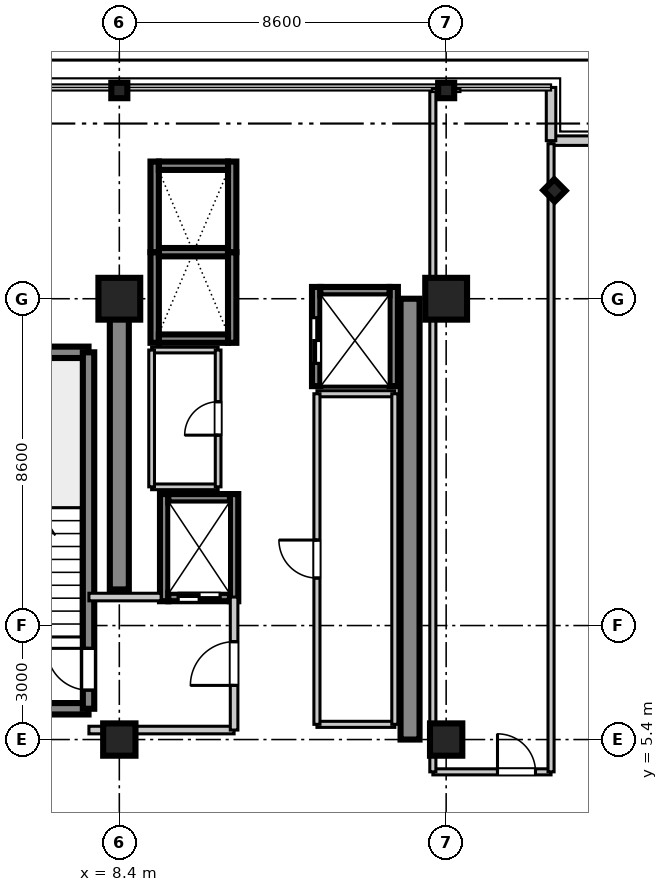
"""IFC4 building model, lengths in metres.
Left out: names, types, materials, properties, quantities, classifications, styles, units other than length and angle.
Written with IfcOpenShell. Run it as: python <this file> out.ifc"""

import sys

from ifc_helpers import new_model, si_unit, direction, frame, frame_2d, origin, origin_2d, place, context, subcontext, project, spatial, rectangle, i_section, extrude, source, transform, mapped, element, fill, save


model = new_model("IFC4")
c1 = context("Model", 3, precision=1e-05, world=origin(), true_north=direction((0.0, 1.0)))
c2 = subcontext(c1, "Body", "Model", "MODEL_VIEW")
j1 = project(units=[si_unit("LENGTHUNIT", "METRE"), si_unit("PLANEANGLEUNIT", "RADIAN")], contexts=[c1])
p1 = place(None, origin())
s1 = spatial("IfcSite", under=j1, at=p1, CompositionType="ELEMENT")
p2 = place(p1, origin())
s2 = spatial("IfcBuilding", under=s1, at=p2, CompositionType="ELEMENT")
p3 = place(p2, frame((0.0, 0.0, 149.0)))
s3 = spatial("IfcBuildingStorey", under=s2, at=p3, CompositionType="ELEMENT", Elevation=149.0)
m1 = source(origin(), c2, "Body", "SweptSolid", [
    extrude(rectangle(XDim=0.85, YDim=0.85, at=origin_2d()), origin(), (0.0, 0.0, 1.0), 3.605),
])
p4 = place(p3, frame((8.4, 5.4, 0.0), z_axis=(0.0, 0.0, 1.0), x_axis=(1.0, 0.0, 0.0)))
e1 = element("IfcColumn", 1, at=p4, inside=s3, PredefinedType="PILASTER", context=c2, shape_type="MappedRepresentation", body=[
    mapped(m1, transform((0.0, 0.0, 0.0), scale=1.0)),
])
m2 = source(origin(), c2, "Body", "SweptSolid", [
    extrude(rectangle(XDim=1.1, YDim=1.1, at=origin_2d()), origin(), (0.0, 0.0, 1.0), 3.605),
])
p5 = place(p3, frame((8.4, 17.0, 0.0), z_axis=(0.0, 0.0, 1.0), x_axis=(1.0, 0.0, 0.0)))
e2 = element("IfcColumn", 2, at=p5, inside=s3, PredefinedType="COLUMN", context=c2, shape_type="MappedRepresentation", body=[
    mapped(m2, transform((0.0, 0.0, 0.0), scale=1.0)),
])
p6 = place(p3, frame((17.0, 5.4, 0.0), z_axis=(0.0, 0.0, 1.0), x_axis=(1.0, 0.0, 0.0)))
e3 = element("IfcColumn", 3, at=p6, inside=s3, PredefinedType="PILASTER", context=c2, shape_type="MappedRepresentation", body=[
    mapped(m1, transform((0.0, 0.0, 0.0), scale=1.0)),
])
p7 = place(p3, frame((17.0, 17.0, 0.0), z_axis=(0.0, 0.0, 1.0), x_axis=(1.0, 0.0, 0.0)))
e4 = element("IfcColumn", 4, at=p7, inside=s3, PredefinedType="COLUMN", context=c2, shape_type="MappedRepresentation", body=[
    mapped(m2, transform((0.0, 0.0, 0.0), scale=1.0)),
])
m3 = source(origin(), c2, "Body", "SweptSolid", [
    extrude(i_section(OverallWidth=0.406, OverallDepth=0.422, WebThickness=0.019, FlangeThickness=0.03, at=origin_2d()), origin(), (0.0, 0.0, 1.0), 3.605),
])
for number, where, z_axis, x_axis in (
    (5, (8.4, 22.48, 0.0), (0.0, 0.0, 1.0), (0.0, 1.0, 0.0)),
    (6, (17.0, 22.48, 0.0), (0.0, 0.0, 1.0), (0.0, 1.0, 0.0)),
    (7, (19.85, 19.85, 0.0), (0.0, 0.0, 1.0), (0.707, 0.707, 0.0)),
):
    element("IfcColumn", number, at=place(p3, frame(where, z_axis=z_axis, x_axis=x_axis)), inside=s3, PredefinedType="COLUMN", context=c2, shape_type="MappedRepresentation", body=[
        mapped(m3, transform((0.0, 0.0, 0.0), scale=1.0)),
    ])
m4 = source(origin(), c2, "Body", "SweptSolid", [
    extrude(rectangle(XDim=7.65, YDim=0.5, at=frame_2d((3.825, 0.0))), origin(), (0.0, 0.0, 1.0), 3.39),
])
p8 = place(p3, frame((8.4, 9.35, 0.0), z_axis=(0.0, 0.0, 1.0), x_axis=(0.0, 1.0, 0.0)))
e8 = element("IfcWall", 8, at=p8, inside=s3, PredefinedType="SHEAR", context=c2, shape_type="MappedRepresentation", body=[
    mapped(m4, transform((0.0, 0.0, 0.0), scale=1.0)),
])
m5 = source(origin(), c2, "Body", "SweptSolid", [
    extrude(rectangle(XDim=11.6, YDim=0.5, at=frame_2d((5.8, 0.0))), origin(), (0.0, 0.0, 1.0), 3.39),
])
p9 = place(p3, frame((16.05, 5.4, 0.0), z_axis=(0.0, 0.0, 1.0), x_axis=(0.0, 1.0, 0.0)))
e9 = element("IfcWall", 9, at=p9, inside=s3, PredefinedType="SHEAR", context=c2, shape_type="MappedRepresentation", body=[
    mapped(m5, transform((0.0, 0.0, 0.0), scale=1.0)),
])
m6 = source(origin(), c2, "Body", "SweptSolid", [
    extrude(rectangle(XDim=3.98, YDim=0.3, at=frame_2d((1.99, 0.0))), origin(), (0.0, 0.0, 1.0), 3.39),
])
for number, where, z_axis, x_axis in (
    (10, (3.61, 6.21, 0.0), (0.0, 0.0, 1.0), (1.0, 0.0, 0.0)),
    (11, (3.61, 15.59, 0.0), (0.0, 0.0, 1.0), (1.0, 0.0, 0.0)),
):
    element("IfcWall", number, at=place(p3, frame(where, z_axis=z_axis, x_axis=x_axis)), inside=s3, PredefinedType="SHEAR", context=c2, shape_type="MappedRepresentation", body=[
        mapped(m6, transform((0.0, 0.0, 0.0), scale=1.0)),
    ])
m7 = source(origin(), c2, "Body", "SweptSolid", [
    extrude(rectangle(XDim=9.38, YDim=0.3, at=frame_2d((4.69, 0.0))), origin(), (0.0, 0.0, 1.0), 3.39),
])
p10 = place(p3, frame((7.59, 6.21, 0.0), z_axis=(0.0, 0.0, 1.0), x_axis=(0.0, 1.0, 0.0)))
e12 = element("IfcWall", 12, at=p10, inside=s3, PredefinedType="SHEAR", context=c2, shape_type="MappedRepresentation", body=[
    mapped(m7, transform((0.0, 0.0, 0.0), scale=1.0)),
])
p11 = place(p10, frame((0.49, 0.0, 0.0)))
e13 = element("IfcOpeningElement", 13, at=p11, cuts=e12, PredefinedType="OPENING", context=c2, shape_type="SweptSolid", body=[
    extrude(rectangle(XDim=1.1, YDim=2.15, at=frame_2d((0.55, 1.075))), frame((0.0, 0.16, 0.0), z_axis=(0.0, -1.0, 0.0), x_axis=(1.0, 0.0, 0.0)), (0.0, 0.0, 1.0), 0.32),
])
m8 = source(origin(), c2, "Body", "SweptSolid", [
    extrude(rectangle(XDim=2.385, YDim=0.22, at=frame_2d((1.192, 0.0))), origin(), (0.0, 0.0, 1.0), 3.39),
])
for number, where, z_axis, x_axis in (
    (14, (9.33, 15.84, 0.0), (0.0, 0.0, 1.0), (0.0, 1.0, 0.0)),
    (15, (11.37, 15.84, 0.0), (0.0, 0.0, 1.0), (0.0, 1.0, 0.0)),
):
    element("IfcWall", number, at=place(p3, frame(where, z_axis=z_axis, x_axis=x_axis)), inside=s3, PredefinedType="SHEAR", context=c2, shape_type="MappedRepresentation", body=[
        mapped(m8, transform((0.0, 0.0, 0.0), scale=1.0)),
    ])
m9 = source(origin(), c2, "Body", "SweptSolid", [
    extrude(rectangle(XDim=1.82, YDim=0.22, at=frame_2d((0.91, 0.0))), origin(), (0.0, 0.0, 1.0), 3.39),
])
p12 = place(p3, frame((9.44, 15.95, 0.0), z_axis=(0.0, 0.0, 1.0), x_axis=(1.0, 0.0, 0.0)))
e16 = element("IfcWall", 16, at=p12, inside=s3, PredefinedType="SHEAR", context=c2, shape_type="MappedRepresentation", body=[
    mapped(m9, transform((0.0, 0.0, 0.0), scale=1.0)),
])
m10 = source(origin(), c2, "Body", "SweptSolid", [
    extrude(rectangle(XDim=1.82, YDim=0.22, at=frame_2d((0.91, 0.0))), origin(), (0.0, 0.0, 1.0), 3.65),
])
p13 = place(p3, frame((9.44, 18.225, 0.0), z_axis=(0.0, 0.0, 1.0), x_axis=(1.0, 0.0, 0.0)))
e17 = element("IfcWall", 17, at=p13, inside=s3, PredefinedType="SHEAR", context=c2, shape_type="MappedRepresentation", body=[
    mapped(m10, transform((0.0, 0.0, 0.0), scale=1.0)),
])
for number, where, z_axis, x_axis in (
    (18, (9.33, 18.225, 0.0), (0.0, 0.0, 1.0), (0.0, 1.0, 0.0)),
    (19, (11.37, 18.225, 0.0), (0.0, 0.0, 1.0), (0.0, 1.0, 0.0)),
):
    element("IfcWall", number, at=place(p3, frame(where, z_axis=z_axis, x_axis=x_axis)), inside=s3, PredefinedType="SHEAR", context=c2, shape_type="MappedRepresentation", body=[
        mapped(m8, transform((0.0, 0.0, 0.0), scale=1.0)),
    ])
p14 = place(p3, frame((9.44, 20.5, 0.0), z_axis=(0.0, 0.0, 1.0), x_axis=(1.0, 0.0, 0.0)))
e20 = element("IfcWall", 20, at=p14, inside=s3, PredefinedType="SHEAR", context=c2, shape_type="MappedRepresentation", body=[
    mapped(m9, transform((0.0, 0.0, 0.0), scale=1.0)),
])
m11 = source(origin(), c2, "Body", "SweptSolid", [
    extrude(rectangle(XDim=2.82, YDim=0.22, at=frame_2d((1.41, 0.0))), origin(), (0.0, 0.0, 1.0), 3.39),
])
for number, where, z_axis, x_axis in (
    (21, (9.58, 9.04, 0.0), (0.0, 0.0, 1.0), (0.0, 1.0, 0.0)),
    (22, (11.42, 9.04, 0.0), (0.0, 0.0, 1.0), (0.0, 1.0, 0.0)),
):
    element("IfcWall", number, at=place(p3, frame(where, z_axis=z_axis, x_axis=x_axis)), inside=s3, PredefinedType="SHEAR", context=c2, shape_type="MappedRepresentation", body=[
        mapped(m11, transform((0.0, 0.0, 0.0), scale=1.0)),
    ])
m12 = source(origin(), c2, "Body", "SweptSolid", [
    extrude(rectangle(XDim=1.62, YDim=0.22, at=frame_2d((0.81, 0.0))), origin(), (0.0, 0.0, 1.0), 3.39),
])
p15 = place(p3, frame((9.69, 9.15, 0.0), z_axis=(0.0, 0.0, 1.0), x_axis=(1.0, 0.0, 0.0)))
e23 = element("IfcWall", 23, at=p15, inside=s3, PredefinedType="SHEAR", context=c2, shape_type="MappedRepresentation", body=[
    mapped(m12, transform((0.0, 0.0, 0.0), scale=1.0)),
])
p16 = place(p15, frame((0.26, 0.0, 0.0)))
e24 = element("IfcOpeningElement", 24, at=p16, cuts=e23, PredefinedType="OPENING", context=c2, shape_type="SweptSolid", body=[
    extrude(rectangle(XDim=1.1, YDim=2.2, at=frame_2d((0.55, 1.1))), frame((0.0, 0.12, 0.0), z_axis=(0.0, -1.0, 0.0), x_axis=(1.0, 0.0, 0.0)), (0.0, 0.0, 1.0), 0.24),
])
p17 = place(p3, frame((9.69, 11.75, 0.0), z_axis=(0.0, 0.0, 1.0), x_axis=(1.0, 0.0, 0.0)))
e25 = element("IfcWall", 25, at=p17, inside=s3, PredefinedType="SHEAR", context=c2, shape_type="MappedRepresentation", body=[
    mapped(m12, transform((0.0, 0.0, 0.0), scale=1.0)),
])
m13 = source(origin(), c2, "Body", "SweptSolid", [
    extrude(rectangle(XDim=2.61, YDim=0.22, at=frame_2d((1.305, 0.0))), origin(), (0.0, 0.0, 1.0), 3.39),
])
p18 = place(p3, frame((13.58, 14.7, 0.0), z_axis=(0.0, 0.0, 1.0), x_axis=(0.0, 1.0, 0.0)))
e26 = element("IfcWall", 26, at=p18, inside=s3, PredefinedType="SHEAR", context=c2, shape_type="MappedRepresentation", body=[
    mapped(m13, transform((0.0, 0.0, 0.0), scale=1.0)),
])
p19 = place(p18, frame((0.6, 0.0, 0.0)))
e27 = element("IfcOpeningElement", 27, at=p19, cuts=e26, PredefinedType="OPENING", context=c2, shape_type="SweptSolid", body=[
    extrude(rectangle(XDim=1.2, YDim=2.2, at=frame_2d((0.6, 1.1))), frame((0.0, 0.12, 0.0), z_axis=(0.0, -1.0, 0.0), x_axis=(1.0, 0.0, 0.0)), (0.0, 0.0, 1.0), 0.24),
])
p20 = place(p3, frame((15.62, 14.7, 0.0), z_axis=(0.0, 0.0, 1.0), x_axis=(0.0, 1.0, 0.0)))
e28 = element("IfcWall", 28, at=p20, inside=s3, PredefinedType="SHEAR", context=c2, shape_type="MappedRepresentation", body=[
    mapped(m13, transform((0.0, 0.0, 0.0), scale=1.0)),
])
p21 = place(p3, frame((13.69, 17.2, 0.0), z_axis=(0.0, 0.0, 1.0), x_axis=(1.0, 0.0, 0.0)))
e29 = element("IfcWall", 29, at=p21, inside=s3, PredefinedType="SHEAR", context=c2, shape_type="MappedRepresentation", body=[
    mapped(m9, transform((0.0, 0.0, 0.0), scale=1.0)),
])
m14 = source(origin(), c2, "Body", "SweptSolid", [
    extrude(rectangle(XDim=1.4, YDim=0.25, at=frame_2d((0.7, 0.0))), origin(), (0.0, 0.0, 1.0), 3.39),
])
p22 = place(p3, frame((19.76, 21.16, 0.0), z_axis=(0.0, 0.0, 1.0), x_axis=(1.0, 0.0, 0.0)))
e30 = element("IfcWall", 30, at=p22, inside=s3, PredefinedType="STANDARD", context=c2, shape_type="MappedRepresentation", body=[
    mapped(m14, transform((0.0, 0.0, 0.0), scale=1.0)),
])
m15 = source(origin(), c2, "Body", "SweptSolid", [
    extrude(rectangle(XDim=1.4, YDim=0.25, at=frame_2d((0.7, 0.0))), origin(), (0.0, 0.0, 1.0), 3.39),
])
p23 = place(p3, frame((19.76, 21.16, 0.0), z_axis=(0.0, 0.0, 1.0), x_axis=(0.0, 1.0, 0.0)))
e31 = element("IfcWall", 31, at=p23, inside=s3, PredefinedType="STANDARD", context=c2, shape_type="MappedRepresentation", body=[
    mapped(m15, transform((0.0, 0.0, 0.0), scale=1.0)),
])
m16 = source(origin(), c2, "Body", "SweptSolid", [
    extrude(rectangle(XDim=3.82, YDim=0.2, at=frame_2d((1.91, 0.0))), origin(), (0.0, 0.0, 1.0), 2.73),
])
p24 = place(p3, frame((7.6, 5.65, 0.0), z_axis=(0.0, 0.0, 1.0), x_axis=(1.0, 0.0, 0.0)))
e32 = element("IfcWall", 32, at=p24, inside=s3, PredefinedType="PARTITIONING", context=c2, shape_type="MappedRepresentation", body=[
    mapped(m16, transform((0.0, 0.0, 0.0), scale=1.0)),
])
m17 = source(origin(), c2, "Body", "SweptSolid", [
    extrude(rectangle(XDim=1.9, YDim=0.2, at=frame_2d((0.95, 0.0))), origin(), (0.0, 0.0, 1.0), 2.73),
])
p25 = place(p3, frame((7.6, 9.15, 0.0), z_axis=(0.0, 0.0, 1.0), x_axis=(1.0, 0.0, 0.0)))
e33 = element("IfcWall", 33, at=p25, inside=s3, PredefinedType="PARTITIONING", context=c2, shape_type="MappedRepresentation", body=[
    mapped(m17, transform((0.0, 0.0, 0.0), scale=1.0)),
])
m18 = source(origin(), c2, "Body", "SweptSolid", [
    extrude(rectangle(XDim=3.5, YDim=0.2, at=frame_2d((1.75, 0.0))), origin(), (0.0, 0.0, 1.0), 2.73),
])
p26 = place(p3, frame((11.42, 5.65, 0.0), z_axis=(0.0, 0.0, 1.0), x_axis=(0.0, 1.0, 0.0)))
e34 = element("IfcWall", 34, at=p26, inside=s3, PredefinedType="PARTITIONING", context=c2, shape_type="MappedRepresentation", body=[
    mapped(m18, transform((0.0, 0.0, 0.0), scale=1.0)),
])
p27 = place(p26, frame((1.175, 0.0, 0.0)))
e35 = element("IfcOpeningElement", 35, at=p27, cuts=e34, PredefinedType="OPENING", context=c2, shape_type="SweptSolid", body=[
    extrude(rectangle(XDim=1.15, YDim=2.15, at=frame_2d((0.575, 1.075))), frame((0.0, 0.11, 0.0), z_axis=(0.0, -1.0, 0.0), x_axis=(1.0, 0.0, 0.0)), (0.0, 0.0, 1.0), 0.22),
])
m19 = source(origin(), c2, "Body", "SweptSolid", [
    extrude(rectangle(XDim=1.75, YDim=0.15, at=frame_2d((0.875, 0.0))), origin(), (0.0, 0.0, 1.0), 2.73),
])
for number, where, z_axis, x_axis in (
    (36, (9.25, 12.05, 0.0), (0.0, 0.0, 1.0), (1.0, 0.0, 0.0)),
    (37, (9.25, 15.65, 0.0), (0.0, 0.0, 1.0), (1.0, 0.0, 0.0)),
):
    element("IfcWall", number, at=place(p3, frame(where, z_axis=z_axis, x_axis=x_axis)), inside=s3, PredefinedType="PARTITIONING", context=c2, shape_type="MappedRepresentation", body=[
        mapped(m19, transform((0.0, 0.0, 0.0), scale=1.0)),
    ])
m20 = source(origin(), c2, "Body", "SweptSolid", [
    extrude(rectangle(XDim=3.6, YDim=0.15, at=frame_2d((1.8, 0.0))), origin(), (0.0, 0.0, 1.0), 2.73),
])
p28 = place(p3, frame((9.25, 12.05, 0.0), z_axis=(0.0, 0.0, 1.0), x_axis=(0.0, 1.0, 0.0)))
e38 = element("IfcWall", 38, at=p28, inside=s3, PredefinedType="PARTITIONING", context=c2, shape_type="MappedRepresentation", body=[
    mapped(m20, transform((0.0, 0.0, 0.0), scale=1.0)),
])
p29 = place(p3, frame((11.0, 12.05, 0.0), z_axis=(0.0, 0.0, 1.0), x_axis=(0.0, 1.0, 0.0)))
e39 = element("IfcWall", 39, at=p29, inside=s3, PredefinedType="PARTITIONING", context=c2, shape_type="MappedRepresentation", body=[
    mapped(m20, transform((0.0, 0.0, 0.0), scale=1.0)),
])
p30 = place(p29, frame((1.36, 0.0, 0.0)))
e40 = element("IfcOpeningElement", 40, at=p30, cuts=e39, PredefinedType="OPENING", context=c2, shape_type="SweptSolid", body=[
    extrude(rectangle(XDim=0.88, YDim=2.1, at=frame_2d((0.44, 1.05))), frame((0.0, 0.085, 0.0), z_axis=(0.0, -1.0, 0.0), x_axis=(1.0, 0.0, 0.0)), (0.0, 0.0, 1.0), 0.17),
])
m21 = source(origin(), c2, "Body", "SweptSolid", [
    extrude(rectangle(XDim=2.05, YDim=0.16, at=frame_2d((1.025, 0.0))), origin(), (0.0, 0.0, 1.0), 2.73),
])
for number, where, z_axis, x_axis in (
    (41, (13.6, 5.8, 0.0), (0.0, 0.0, 1.0), (1.0, 0.0, 0.0)),
    (42, (13.6, 14.5, 0.0), (0.0, 0.0, 1.0), (1.0, 0.0, 0.0)),
):
    element("IfcWall", number, at=place(p3, frame(where, z_axis=z_axis, x_axis=x_axis)), inside=s3, PredefinedType="PARTITIONING", context=c2, shape_type="MappedRepresentation", body=[
        mapped(m21, transform((0.0, 0.0, 0.0), scale=1.0)),
    ])
m22 = source(origin(), c2, "Body", "SweptSolid", [
    extrude(rectangle(XDim=8.7, YDim=0.16, at=frame_2d((4.35, 0.0))), origin(), (0.0, 0.0, 1.0), 2.73),
])
p31 = place(p3, frame((13.6, 5.8, 0.0), z_axis=(0.0, 0.0, 1.0), x_axis=(0.0, 1.0, 0.0)))
e43 = element("IfcWall", 43, at=p31, inside=s3, PredefinedType="PARTITIONING", context=c2, shape_type="MappedRepresentation", body=[
    mapped(m22, transform((0.0, 0.0, 0.0), scale=1.0)),
])
p32 = place(p31, frame((3.85, 0.0, 0.0)))
e44 = element("IfcOpeningElement", 44, at=p32, cuts=e43, PredefinedType="OPENING", context=c2, shape_type="SweptSolid", body=[
    extrude(rectangle(XDim=1.0, YDim=2.1, at=frame_2d((0.5, 1.05))), frame((0.0, 0.09, 0.0), z_axis=(0.0, -1.0, 0.0), x_axis=(1.0, 0.0, 0.0)), (0.0, 0.0, 1.0), 0.18),
])
p33 = place(p3, frame((15.65, 5.8, 0.0), z_axis=(0.0, 0.0, 1.0), x_axis=(0.0, 1.0, 0.0)))
e45 = element("IfcWall", 45, at=p33, inside=s3, PredefinedType="PARTITIONING", context=c2, shape_type="MappedRepresentation", body=[
    mapped(m22, transform((0.0, 0.0, 0.0), scale=1.0)),
])
m23 = source(origin(), c2, "Body", "SweptSolid", [
    extrude(rectangle(XDim=3.11, YDim=0.16, at=frame_2d((1.555, 0.0))), origin(), (0.0, 0.0, 1.0), 2.73),
])
p34 = place(p3, frame((16.65, 4.55, 0.0), z_axis=(0.0, 0.0, 1.0), x_axis=(1.0, 0.0, 0.0)))
e46 = element("IfcWall", 46, at=p34, inside=s3, PredefinedType="PARTITIONING", context=c2, shape_type="MappedRepresentation", body=[
    mapped(m23, transform((0.0, 0.0, 0.0), scale=1.0)),
])
p35 = place(p34, frame((1.701, 0.0, 0.0)))
e47 = element("IfcOpeningElement", 47, at=p35, cuts=e46, PredefinedType="OPENING", context=c2, shape_type="SweptSolid", body=[
    extrude(rectangle(XDim=1.0, YDim=2.1, at=frame_2d((0.5, 1.05))), frame((0.0, 0.09, 0.0), z_axis=(0.0, -1.0, 0.0), x_axis=(1.0, 0.0, 0.0)), (0.0, 0.0, 1.0), 0.18),
])
m24 = source(origin(), c2, "Body", "SweptSolid", [
    extrude(rectangle(XDim=17.95, YDim=0.16, at=frame_2d((8.975, 0.0))), origin(), (0.0, 0.0, 1.0), 2.73),
])
p36 = place(p3, frame((16.65, 4.55, 0.0), z_axis=(0.0, 0.0, 1.0), x_axis=(0.0, 1.0, 0.0)))
e48 = element("IfcWall", 48, at=p36, inside=s3, PredefinedType="PARTITIONING", context=c2, shape_type="MappedRepresentation", body=[
    mapped(m24, transform((0.0, 0.0, 0.0), scale=1.0)),
])
m25 = source(origin(), c2, "Body", "SweptSolid", [
    extrude(rectangle(XDim=16.53, YDim=0.16, at=frame_2d((8.265, 0.0))), origin(), (0.0, 0.0, 1.0), 2.73),
])
p37 = place(p3, frame((19.76, 4.55, 0.0), z_axis=(0.0, 0.0, 1.0), x_axis=(0.0, 1.0, 0.0)))
e49 = element("IfcWall", 49, at=p37, inside=s3, PredefinedType="PARTITIONING", context=c2, shape_type="MappedRepresentation", body=[
    mapped(m25, transform((0.0, 0.0, 0.0), scale=1.0)),
])
m26 = source(origin(), c2, "Body", "SweptSolid", [
    extrude(rectangle(XDim=1.1, YDim=2.15, at=frame_2d((0.55, 1.075))), frame((0.0, 0.025, 0.0), z_axis=(0.0, -1.0, 0.0), x_axis=(1.0, 0.0, 0.0)), (0.0, 0.0, 1.0), 0.05),
])
p38 = place(p11, origin())
e50 = element("IfcDoor", 50, at=p38, inside=s3, OperationType="SINGLE_SWING_RIGHT", PredefinedType="DOOR", context=c2, shape_type="MappedRepresentation", body=[
    mapped(m26, transform((0.0, 0.0, 0.0), scale=1.0)),
])
fill(e13, e50)
m27 = source(origin(), c2, "Body", "SweptSolid", [
    extrude(rectangle(XDim=1.1, YDim=2.2, at=frame_2d((0.55, 1.1))), frame((0.0, 0.025, 0.0), z_axis=(0.0, -1.0, 0.0), x_axis=(1.0, 0.0, 0.0)), (0.0, 0.0, 1.0), 0.05),
])
p39 = place(p16, frame((1.1, 0.0, 0.0), z_axis=(0.0, 0.0, 1.0), x_axis=(-1.0, 0.0, 0.0)))
e51 = element("IfcDoor", 51, at=p39, inside=s3, OperationType="DOUBLE_DOOR_SLIDING", PredefinedType="DOOR", context=c2, shape_type="MappedRepresentation", body=[
    mapped(m27, transform((0.0, 0.0, 0.0), scale=1.0)),
])
fill(e24, e51)
m28 = source(origin(), c2, "Body", "SweptSolid", [
    extrude(rectangle(XDim=1.2, YDim=2.2, at=frame_2d((0.6, 1.1))), frame((0.0, 0.025, 0.0), z_axis=(0.0, -1.0, 0.0), x_axis=(1.0, 0.0, 0.0)), (0.0, 0.0, 1.0), 0.05),
])
p40 = place(p19, origin())
e52 = element("IfcDoor", 52, at=p40, inside=s3, OperationType="DOUBLE_DOOR_SLIDING", PredefinedType="DOOR", context=c2, shape_type="MappedRepresentation", body=[
    mapped(m28, transform((0.0, 0.0, 0.0), scale=1.0)),
])
fill(e27, e52)
m29 = source(origin(), c2, "Body", "SweptSolid", [
    extrude(rectangle(XDim=1.15, YDim=2.15, at=frame_2d((0.575, 1.075))), frame((0.0, 0.025, 0.0), z_axis=(0.0, -1.0, 0.0), x_axis=(1.0, 0.0, 0.0)), (0.0, 0.0, 1.0), 0.05),
])
p41 = place(p27, frame((1.15, 0.0, 0.0), z_axis=(0.0, 0.0, 1.0), x_axis=(-1.0, 0.0, 0.0)))
e53 = element("IfcDoor", 53, at=p41, inside=s3, OperationType="SINGLE_SWING_LEFT", PredefinedType="DOOR", context=c2, shape_type="MappedRepresentation", body=[
    mapped(m29, transform((0.0, 0.0, 0.0), scale=1.0)),
])
fill(e35, e53)
m30 = source(origin(), c2, "Body", "SweptSolid", [
    extrude(rectangle(XDim=0.88, YDim=2.1, at=frame_2d((0.44, 1.05))), frame((0.0, 0.025, 0.0), z_axis=(0.0, -1.0, 0.0), x_axis=(1.0, 0.0, 0.0)), (0.0, 0.0, 1.0), 0.05),
])
p42 = place(p30, origin())
e54 = element("IfcDoor", 54, at=p42, inside=s3, OperationType="SINGLE_SWING_LEFT", PredefinedType="DOOR", context=c2, shape_type="MappedRepresentation", body=[
    mapped(m30, transform((0.0, 0.0, 0.0), scale=1.0)),
])
fill(e40, e54)
m31 = source(origin(), c2, "Body", "SweptSolid", [
    extrude(rectangle(XDim=1.0, YDim=2.1, at=frame_2d((0.5, 1.05))), frame((0.0, 0.025, 0.0), z_axis=(0.0, -1.0, 0.0), x_axis=(1.0, 0.0, 0.0)), (0.0, 0.0, 1.0), 0.05),
])
p43 = place(p32, frame((1.0, 0.0, 0.0), z_axis=(0.0, 0.0, 1.0), x_axis=(-1.0, 0.0, 0.0)))
e55 = element("IfcDoor", 55, at=p43, inside=s3, OperationType="SINGLE_SWING_RIGHT", PredefinedType="DOOR", context=c2, shape_type="MappedRepresentation", body=[
    mapped(m31, transform((0.0, 0.0, 0.0), scale=1.0)),
])
fill(e44, e55)
p44 = place(p35, origin())
e56 = element("IfcDoor", 56, at=p44, inside=s3, OperationType="SINGLE_SWING_LEFT", PredefinedType="DOOR", context=c2, shape_type="MappedRepresentation", body=[
    mapped(m31, transform((0.0, 0.0, 0.0), scale=1.0)),
])
fill(e47, e56)
save(model, sys.argv[1])
